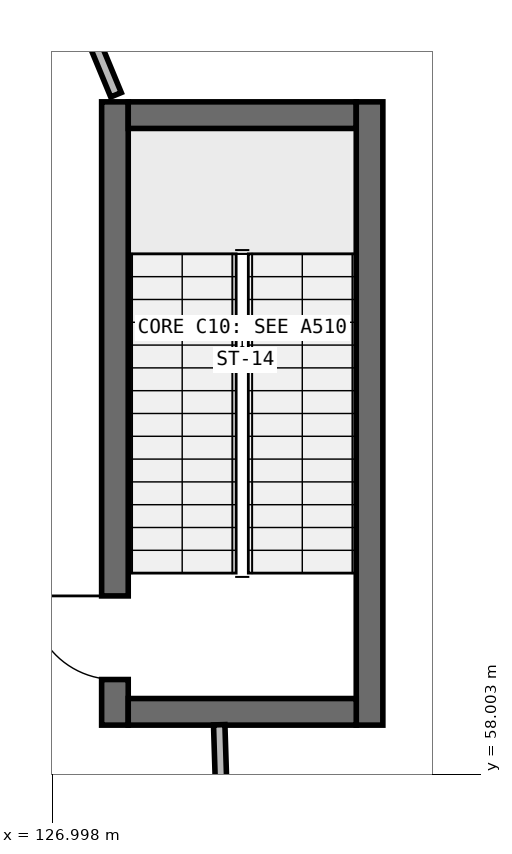
"""IFC4 building model, lengths in metres.
Left out: names, types, materials, properties, quantities, classifications, styles, units other than length and angle.
Written with IfcOpenShell. Run it as: python <this file> out.ifc"""

import sys

from ifc_helpers import new_model, si_unit, direction, frame, frame_2d, origin, place, context, subcontext, project, spatial, rectangle, extrude, element, fill, save


model = new_model("IFC4")
c1 = context("Model", 3, precision=1e-05, world=origin(), true_north=direction((0.0, 1.0)))
c2 = subcontext(c1, "Body", "Model", "MODEL_VIEW")
j1 = project(units=[si_unit("LENGTHUNIT", "METRE"), si_unit("PLANEANGLEUNIT", "RADIAN")], contexts=[c1])
p1 = place(None, origin())
s1 = spatial("IfcSite", under=j1, at=p1, CompositionType="ELEMENT")
p2 = place(p1, origin())
s2 = spatial("IfcBuilding", under=s1, at=p2, CompositionType="ELEMENT")
p3 = place(p2, origin())
s3 = spatial("IfcBuildingStorey", under=s2, at=p3, CompositionType="ELEMENT", Elevation=0.0)
p4 = place(p3, frame((127.825, 58.65, 0.0), z_axis=(0.0, 0.0, 1.0), x_axis=(0.0, 1.0, 0.0)))
e1 = element("IfcWall", 1, at=p4, inside=s3, PredefinedType="SHEAR", context=c2, shape_type="SweptSolid", body=[
    extrude(rectangle(XDim=8.2, YDim=0.35, at=frame_2d((4.1, 0.0))), origin(), (0.0, 0.0, 1.0), 5.25),
])
p5 = place(p4, frame((0.6, 0.0, 0.0)))
e2 = element("IfcOpeningElement", 2, at=p5, cuts=e1, PredefinedType="OPENING", context=c2, shape_type="SweptSolid", body=[
    extrude(rectangle(XDim=1.1, YDim=2.15, at=frame_2d((0.55, 1.075))), frame((0.0, 0.185, 0.0), z_axis=(0.0, -1.0, 0.0), x_axis=(1.0, 0.0, 0.0)), (0.0, 0.0, 1.0), 0.37),
])
p6 = place(p3, frame((128.0, 66.675, 0.0), z_axis=(0.0, 0.0, 1.0), x_axis=(1.0, 0.0, 0.0)))
e3 = element("IfcWall", 3, at=p6, inside=s3, PredefinedType="SHEAR", context=c2, shape_type="SweptSolid", body=[
    extrude(rectangle(XDim=3.0, YDim=0.35, at=frame_2d((1.5, 0.0))), origin(), (0.0, 0.0, 1.0), 5.25),
])
p7 = place(p3, frame((131.175, 66.85, 0.0), z_axis=(0.0, 0.0, 1.0), x_axis=(0.0, -1.0, 0.0)))
e4 = element("IfcWall", 4, at=p7, inside=s3, PredefinedType="SHEAR", context=c2, shape_type="SweptSolid", body=[
    extrude(rectangle(XDim=8.2, YDim=0.35, at=frame_2d((4.1, 0.0))), origin(), (0.0, 0.0, 1.0), 5.25),
])
p8 = place(p3, frame((131.0, 58.825, 0.0), z_axis=(0.0, 0.0, 1.0), x_axis=(-1.0, 0.0, 0.0)))
e5 = element("IfcWall", 5, at=p8, inside=s3, PredefinedType="SHEAR", context=c2, shape_type="SweptSolid", body=[
    extrude(rectangle(XDim=3.0, YDim=0.35, at=frame_2d((1.5, 0.0))), origin(), (0.0, 0.0, 1.0), 5.25),
])
p9 = place(p3, frame((129.28, 56.0, 0.0), z_axis=(0.0, 0.0, 1.0), x_axis=(-0.031249099163, 0.999511627647, 0.0)))
e6 = element("IfcWall", 6, at=p9, inside=s3, PredefinedType="PARTITIONING", context=c2, shape_type="SweptSolid", body=[
    extrude(rectangle(XDim=2.656, YDim=0.15, at=frame_2d((1.328, 0.0))), origin(), (0.0, 0.0, 1.0), 4.93),
])
p10 = place(p3, frame((127.839, 66.943, 0.0), z_axis=(0.0, 0.0, 1.0), x_axis=(-0.382644845446, 0.923895514793, 0.0)))
e7 = element("IfcWall", 7, at=p10, inside=s3, PredefinedType="PARTITIONING", context=c2, shape_type="SweptSolid", body=[
    extrude(rectangle(XDim=11.037, YDim=0.15, at=frame_2d((5.518, 0.0))), origin(), (0.0, 0.0, 1.0), 4.438),
])
p11 = place(p10, frame((4.95, 0.0, 0.0)))
e8 = element("IfcOpeningElement", 8, at=p11, cuts=e7, PredefinedType="OPENING", context=c2, shape_type="SweptSolid", body=[
    extrude(rectangle(XDim=1.1, YDim=2.2, at=frame_2d((0.55, 1.1))), frame((0.0, 0.085, 0.0), z_axis=(0.0, -1.0, 0.0), x_axis=(1.0, 0.0, 0.0)), (0.0, 0.0, 1.0), 0.17),
])
p12 = place(p5, origin())
e9 = element("IfcDoor", 9, at=p12, inside=s3, OperationType="SINGLE_SWING_RIGHT", PredefinedType="DOOR", context=c2, shape_type="SweptSolid", body=[
    extrude(rectangle(XDim=1.1, YDim=2.15, at=frame_2d((0.55, 1.075))), frame((0.0, 0.025, 0.0), z_axis=(0.0, -1.0, 0.0), x_axis=(1.0, 0.0, 0.0)), (0.0, 0.0, 1.0), 0.05),
])
fill(e2, e9)
save(model, sys.argv[1])
